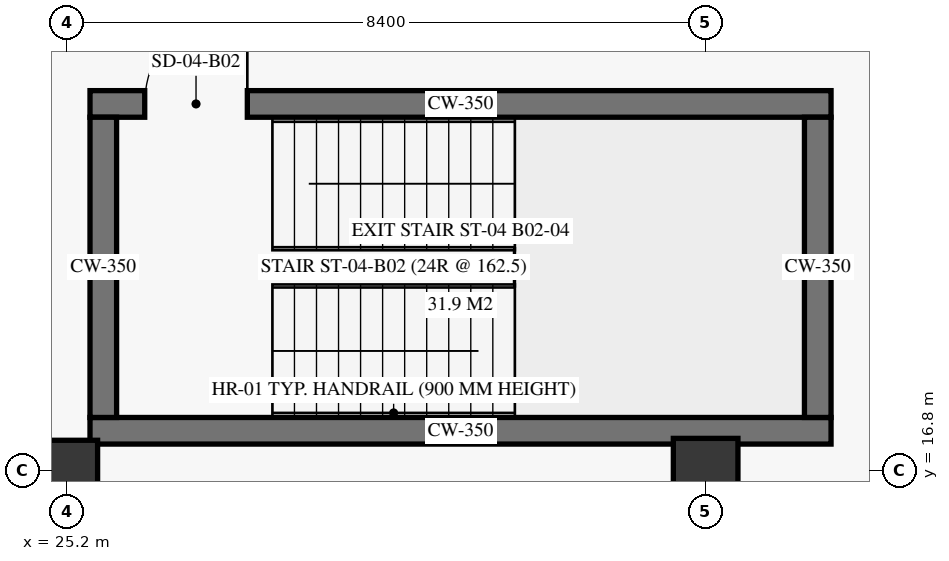
"""IFC4 building model, lengths in metres.
Left out: names, types, materials, properties, quantities, classifications, styles, units other than length and angle.
Written with IfcOpenShell. Run it as: python <this file> out.ifc"""

import sys

from ifc_helpers import new_model, si_unit, direction, frame, frame_2d, origin, origin_2d, place, context, subcontext, project, spatial, rectangle, extrude, element, fill, save


model = new_model("IFC4")
c1 = context("Model", 3, precision=1e-05, world=origin(), true_north=direction((0.0, 1.0)))
c2 = subcontext(c1, "Body", "Model", "MODEL_VIEW")
j1 = project(units=[si_unit("LENGTHUNIT", "METRE"), si_unit("PLANEANGLEUNIT", "RADIAN")], contexts=[c1])
p1 = place(None, origin())
s1 = spatial("IfcSite", under=j1, at=p1, CompositionType="ELEMENT")
p2 = place(p1, origin())
s2 = spatial("IfcBuilding", under=s1, at=p2, CompositionType="ELEMENT")
p3 = place(p2, frame((0.0, 0.0, -8.1)))
s3 = spatial("IfcBuildingStorey", under=s2, at=p3, CompositionType="ELEMENT", Elevation=-8.1)
p4 = place(p3, frame((25.2, 16.8, 0.0), z_axis=(0.0, 0.0, 1.0), x_axis=(1.0, 0.0, 0.0)))
e1 = element("IfcColumn", 1, at=p4, inside=s3, PredefinedType="COLUMN", context=c2, shape_type="SweptSolid", body=[
    extrude(rectangle(XDim=0.8, YDim=0.8, at=origin_2d()), origin(), (0.0, 0.0, 1.0), 3.6),
])
p5 = place(p3, frame((33.6, 16.8, 0.0), z_axis=(0.0, 0.0, 1.0), x_axis=(1.0, 0.0, 0.0)))
e2 = element("IfcColumn", 2, at=p5, inside=s3, PredefinedType="COLUMN", context=c2, shape_type="SweptSolid", body=[
    extrude(rectangle(XDim=0.85, YDim=0.85, at=origin_2d()), origin(), (0.0, 0.0, 1.0), 3.6),
])
p6 = place(p3, frame((25.5, 17.325, 0.0), z_axis=(0.0, 0.0, 1.0), x_axis=(1.0, 0.0, 0.0)))
e3 = element("IfcWall", 3, at=p6, inside=s3, PredefinedType="SHEAR", context=c2, shape_type="SweptSolid", body=[
    extrude(rectangle(XDim=9.75, YDim=0.35, at=frame_2d((4.875, 0.0))), origin(), (0.0, 0.0, 1.0), 3.6),
])
p7 = place(p3, frame((25.5, 21.625, 0.0), z_axis=(0.0, 0.0, 1.0), x_axis=(1.0, 0.0, 0.0)))
e4 = element("IfcWall", 4, at=p7, inside=s3, PredefinedType="SHEAR", context=c2, shape_type="SweptSolid", body=[
    extrude(rectangle(XDim=9.75, YDim=0.35, at=frame_2d((4.875, 0.0))), origin(), (0.0, 0.0, 1.0), 3.6),
])
p8 = place(p7, frame((0.72, 0.0, 0.0)))
e5 = element("IfcOpeningElement", 5, at=p8, cuts=e4, PredefinedType="OPENING", context=c2, shape_type="SweptSolid", body=[
    extrude(rectangle(XDim=1.35, YDim=2.25, at=frame_2d((0.675, 1.125))), frame((0.0, 0.185, 0.0), z_axis=(0.0, -1.0, 0.0), x_axis=(1.0, 0.0, 0.0)), (0.0, 0.0, 1.0), 0.37),
])
for number, where, z_axis, x_axis in (
    (6, (25.675, 17.5, 0.0), (0.0, 0.0, 1.0), (0.0, 1.0, 0.0)),
    (7, (35.075, 17.5, 0.0), (0.0, 0.0, 1.0), (0.0, 1.0, 0.0)),
):
    element("IfcWall", number, at=place(p3, frame(where, z_axis=z_axis, x_axis=x_axis)), inside=s3, PredefinedType="SHEAR", context=c2, shape_type="SweptSolid", body=[
        extrude(rectangle(XDim=3.95, YDim=0.35, at=frame_2d((1.975, 0.0))), origin(), (0.0, 0.0, 1.0), 3.6),
    ])
p9 = place(p8, origin())
e8 = element("IfcDoor", 8, at=p9, inside=s3, OperationType="SINGLE_SWING_RIGHT", PredefinedType="DOOR", context=c2, shape_type="SweptSolid", body=[
    extrude(rectangle(XDim=1.35, YDim=2.25, at=frame_2d((0.675, 1.125))), frame((0.0, 0.025, 0.0), z_axis=(0.0, -1.0, 0.0), x_axis=(1.0, 0.0, 0.0)), (0.0, 0.0, 1.0), 0.05),
])
fill(e5, e8)
save(model, sys.argv[1])
